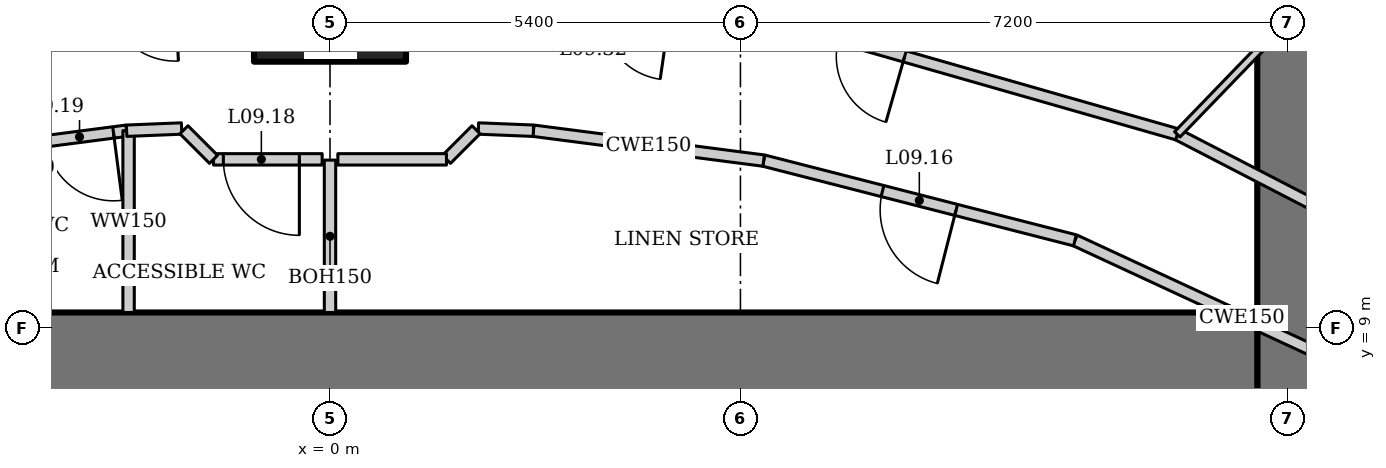
"""IFC4 building model, lengths in metres.
Left out: names, types, materials, properties, quantities, classifications, styles, units other than length and angle.
Written with IfcOpenShell. Run it as: python <this file> out.ifc"""

import sys

from ifc_helpers import new_model, si_unit, direction, frame, frame_2d, origin, origin_2d, place, context, subcontext, project, spatial, rectangle, hollow_rectangle, extrude, element, fill, save


model = new_model("IFC4")
c1 = context("Model", 3, precision=1e-05, world=origin(), true_north=direction((0.0, 1.0)))
c2 = subcontext(c1, "Body", "Model", "MODEL_VIEW")
j1 = project(units=[si_unit("LENGTHUNIT", "METRE"), si_unit("PLANEANGLEUNIT", "RADIAN")], contexts=[c1])
p1 = place(None, origin())
s1 = spatial("IfcSite", under=j1, at=p1, CompositionType="ELEMENT")
p2 = place(p1, origin())
s2 = spatial("IfcBuilding", under=s1, at=p2, CompositionType="ELEMENT")
p3 = place(p2, frame((0.0, 0.0, 47.8)))
s3 = spatial("IfcBuildingStorey", under=s2, at=p3, CompositionType="ELEMENT", Elevation=47.8)
p4 = place(p3, frame((0.0, 13.5, 0.0), z_axis=(0.0, 0.0, 1.0), x_axis=(1.0, 0.0, 0.0)))
e1 = element("IfcColumn", 1, at=p4, inside=s3, PredefinedType="COLUMN", context=c2, shape_type="SweptSolid", body=[
    extrude(hollow_rectangle(XDim=2.0, YDim=2.0, WallThickness=0.17, at=origin_2d()), origin(), (0.0, 0.0, 1.0), 3.6),
])
p5 = place(p3, frame((13.2, -13.0, 0.0), z_axis=(0.0, 0.0, 1.0), x_axis=(0.0, 1.0, 0.0)))
e2 = element("IfcWall", 2, at=p5, inside=s3, PredefinedType="SHEAR", context=c2, shape_type="SweptSolid", body=[
    extrude(rectangle(XDim=26.0, YDim=2.0, at=frame_2d((13.0, 0.0))), origin(), (0.0, 0.0, 1.0), 3.6),
])
p6 = place(p5, frame((12.1, 0.0, 0.0)))
e3 = element("IfcOpeningElement", 3, at=p6, cuts=e2, PredefinedType="OPENING", context=c2, shape_type="SweptSolid", body=[
    extrude(rectangle(XDim=1.8, YDim=2.1, at=frame_2d((0.9, 1.05))), frame((0.0, 1.01, 0.0), z_axis=(0.0, -1.0, 0.0), x_axis=(1.0, 0.0, 0.0)), (0.0, 0.0, 1.0), 2.02),
])
p7 = place(p3, frame((12.2, 8.0, 0.0), z_axis=(0.0, 0.0, 1.0), x_axis=(-1.0, 0.0, 0.0)))
e4 = element("IfcWall", 4, at=p7, inside=s3, PredefinedType="SHEAR", context=c2, shape_type="SweptSolid", body=[
    extrude(rectangle(XDim=24.4, YDim=2.4, at=frame_2d((12.2, 0.0))), origin(), (0.0, 0.0, 1.0), 3.6),
])
p8 = place(p3, frame((15.901, 9.086, 0.0), z_axis=(0.0, 0.0, 1.0), x_axis=(-0.888333171507, 0.459199495209, 0.0)))
e5 = element("IfcWall", 5, at=p8, inside=s3, PredefinedType="PARTITIONING", context=c2, shape_type="SweptSolid", body=[
    extrude(rectangle(XDim=5.351, YDim=0.15, at=frame_2d((2.676, 0.0))), origin(), (0.0, 0.0, 1.0), 3.45),
])
p9 = place(p3, frame((11.147, 11.544, 0.0), z_axis=(0.0, 0.0, 1.0), x_axis=(-0.961464178199, 0.27493023486, 0.0)))
e6 = element("IfcWall", 6, at=p9, inside=s3, PredefinedType="PARTITIONING", context=c2, shape_type="SweptSolid", body=[
    extrude(rectangle(XDim=4.78, YDim=0.15, at=frame_2d((2.39, 0.0))), origin(), (0.0, 0.0, 1.0), 3.45),
])
p10 = place(p9, frame((3.73, 0.0, 0.0)))
e7 = element("IfcOpeningElement", 7, at=p10, cuts=e6, PredefinedType="OPENING", context=c2, shape_type="SweptSolid", body=[
    extrude(rectangle(XDim=0.9, YDim=2.1, at=frame_2d((0.45, 1.05))), frame((0.0, 0.085, 0.0), z_axis=(0.0, -1.0, 0.0), x_axis=(1.0, 0.0, 0.0)), (0.0, 0.0, 1.0), 0.17),
])
p11 = place(p3, frame((14.196, 8.112, 0.0), z_axis=(0.0, 0.0, 1.0), x_axis=(-0.907279653965, 0.420527798727, 0.0)))
e8 = element("IfcWall", 8, at=p11, inside=s3, PredefinedType="PARTITIONING", context=c2, shape_type="SweptSolid", body=[
    extrude(rectangle(XDim=4.844, YDim=0.15, at=frame_2d((2.422, 0.0))), origin(), (0.0, 0.0, 1.0), 3.45),
])
p12 = place(p3, frame((9.801, 10.149, 0.0), z_axis=(0.0, 0.0, 1.0), x_axis=(-0.968705891355, 0.248211393886, 0.0)))
e9 = element("IfcWall", 9, at=p12, inside=s3, PredefinedType="PARTITIONING", context=c2, shape_type="SweptSolid", body=[
    extrude(rectangle(XDim=4.228, YDim=0.15, at=frame_2d((2.114, 0.0))), origin(), (0.0, 0.0, 1.0), 3.45),
])
p13 = place(p12, frame((1.614, 0.0, 0.0)))
e10 = element("IfcOpeningElement", 10, at=p13, cuts=e9, PredefinedType="OPENING", context=c2, shape_type="SweptSolid", body=[
    extrude(rectangle(XDim=1.0, YDim=2.1, at=frame_2d((0.5, 1.05))), frame((0.0, 0.085, 0.0), z_axis=(0.0, -1.0, 0.0), x_axis=(1.0, 0.0, 0.0)), (0.0, 0.0, 1.0), 0.17),
])
p14 = place(p3, frame((5.706, 11.198, 0.0), z_axis=(0.0, 0.0, 1.0), x_axis=(-0.99168929531, 0.128655903743, 0.0)))
e11 = element("IfcWall", 11, at=p14, inside=s3, PredefinedType="PARTITIONING", context=c2, shape_type="SweptSolid", body=[
    extrude(rectangle(XDim=3.055, YDim=0.15, at=frame_2d((1.528, 0.0))), origin(), (0.0, 0.0, 1.0), 3.45),
])
p15 = place(p3, frame((-2.676, 11.592, 0.0), z_axis=(0.0, 0.0, 1.0), x_axis=(-0.99168929531, -0.128655903743, 0.0)))
e12 = element("IfcWall", 12, at=p15, inside=s3, PredefinedType="PARTITIONING", context=c2, shape_type="SweptSolid", body=[
    extrude(rectangle(XDim=3.055, YDim=0.15, at=frame_2d((1.528, 0.0))), origin(), (0.0, 0.0, 1.0), 3.45),
])
p16 = place(p15, frame((0.175, 0.0, 0.0)))
e13 = element("IfcOpeningElement", 13, at=p16, cuts=e12, PredefinedType="OPENING", context=c2, shape_type="SweptSolid", body=[
    extrude(rectangle(XDim=0.9, YDim=2.1, at=frame_2d((0.45, 1.05))), frame((0.0, 0.085, 0.0), z_axis=(0.0, -1.0, 0.0), x_axis=(1.0, 0.0, 0.0)), (0.0, 0.0, 1.0), 0.17),
])
p17 = place(p3, frame((-2.65, 9.2, 0.0), z_axis=(0.0, 0.0, 1.0), x_axis=(0.0, 1.0, 0.0)))
e14 = element("IfcWall", 14, at=p17, inside=s3, PredefinedType="SOLIDWALL", context=c2, shape_type="SweptSolid", body=[
    extrude(rectangle(XDim=2.393, YDim=0.15, at=frame_2d((1.196, 0.0))), origin(), (0.0, 0.0, 1.0), 2.767),
])
p18 = place(p3, frame((16.944, 17.545, 0.0), z_axis=(0.0, 0.0, 1.0), x_axis=(-0.694680670522, -0.71931826475, 0.0)))
e15 = element("IfcWall", 15, at=p18, inside=s3, PredefinedType="PARTITIONING", context=c2, shape_type="SweptSolid", body=[
    extrude(rectangle(XDim=8.344, YDim=0.1, at=frame_2d((4.172, 0.0))), origin(), (0.0, 0.0, 1.0), 2.528),
])
p19 = place(p18, frame((3.722, 0.0, 0.0)))
e16 = element("IfcOpeningElement", 16, at=p19, cuts=e15, PredefinedType="OPENING", context=c2, shape_type="SweptSolid", body=[
    extrude(rectangle(XDim=0.9, YDim=2.1, at=frame_2d((0.45, 1.05))), frame((0.0, 0.06, 0.0), z_axis=(0.0, -1.0, 0.0), x_axis=(1.0, 0.0, 0.0)), (0.0, 0.0, 1.0), 0.12),
])
for number, where, z_axis, x_axis in (
    (17, (2.676, 11.592, 0.0), (0.0, 0.0, 1.0), (-0.999, 0.04, 0.0)),
    (18, (-1.952, 11.621, 0.0), (0.0, 0.0, 1.0), (-0.999, -0.04, 0.0)),
):
    element("IfcWall", number, at=place(p3, frame(where, z_axis=z_axis, x_axis=x_axis)), inside=s3, PredefinedType="PARTITIONING", context=c2, shape_type="SweptSolid", body=[
        extrude(rectangle(XDim=0.724, YDim=0.15, at=frame_2d((0.362, 0.0))), origin(), (0.0, 0.0, 1.0), 3.45),
    ])
p20 = place(p3, frame((0.0, 9.2, 0.0), z_axis=(0.0, 0.0, 1.0), x_axis=(0.0, 1.0, 0.0)))
e19 = element("IfcWall", 19, at=p20, inside=s3, PredefinedType="PARTITIONING", context=c2, shape_type="SweptSolid", body=[
    extrude(rectangle(XDim=2.005, YDim=0.15, at=frame_2d((1.002, 0.0))), origin(), (0.0, 0.0, 1.0), 3.043),
])
p21 = place(p3, frame((1.922, 11.604, 0.0), z_axis=(0.0, 0.0, 1.0), x_axis=(-0.707328479487, -0.706885013356, 0.0)))
e20 = element("IfcWall", 20, at=p21, inside=s3, PredefinedType="PARTITIONING", context=c2, shape_type="SweptSolid", body=[
    extrude(rectangle(XDim=0.551, YDim=0.15, at=frame_2d((0.275, 0.0))), origin(), (0.0, 0.0, 1.0), 3.45),
])
p22 = place(p3, frame((1.532, 11.215, 0.0), z_axis=(0.0, 0.0, 1.0), x_axis=(-1.0, 0.0, 0.0)))
e21 = element("IfcWall", 21, at=p22, inside=s3, PredefinedType="PARTITIONING", context=c2, shape_type="SweptSolid", body=[
    extrude(rectangle(XDim=1.429, YDim=0.15, at=frame_2d((0.714, 0.0))), origin(), (0.0, 0.0, 1.0), 3.45),
])
p23 = place(p3, frame((-0.103, 11.215, 0.0), z_axis=(0.0, 0.0, 1.0), x_axis=(-1.0, 0.0, 0.0)))
e22 = element("IfcWall", 22, at=p23, inside=s3, PredefinedType="PARTITIONING", context=c2, shape_type="SweptSolid", body=[
    extrude(rectangle(XDim=1.429, YDim=0.15, at=frame_2d((0.714, 0.0))), origin(), (0.0, 0.0, 1.0), 3.45),
])
p24 = place(p23, frame((0.3, 0.0, 0.0)))
e23 = element("IfcOpeningElement", 23, at=p24, cuts=e22, PredefinedType="OPENING", context=c2, shape_type="SweptSolid", body=[
    extrude(rectangle(XDim=1.0, YDim=2.1, at=frame_2d((0.5, 1.05))), frame((0.0, 0.085, 0.0), z_axis=(0.0, -1.0, 0.0), x_axis=(1.0, 0.0, 0.0)), (0.0, 0.0, 1.0), 0.17),
])
p25 = place(p3, frame((-1.532, 11.215, 0.0), z_axis=(0.0, 0.0, 1.0), x_axis=(-0.707328479487, 0.706885013356, 0.0)))
e24 = element("IfcWall", 24, at=p25, inside=s3, PredefinedType="PARTITIONING", context=c2, shape_type="SweptSolid", body=[
    extrude(rectangle(XDim=0.551, YDim=0.15, at=frame_2d((0.275, 0.0))), origin(), (0.0, 0.0, 1.0), 3.45),
])
p26 = place(p13, origin())
e25 = element("IfcDoor", 25, at=p26, inside=s3, OperationType="SINGLE_SWING_LEFT", PredefinedType="DOOR", context=c2, shape_type="SweptSolid", body=[
    extrude(rectangle(XDim=1.0, YDim=2.1, at=frame_2d((0.5, 1.05))), frame((0.0, 0.025, 0.0), z_axis=(0.0, -1.0, 0.0), x_axis=(1.0, 0.0, 0.0)), (0.0, 0.0, 1.0), 0.05),
])
fill(e10, e25)
p27 = place(p24, origin())
e26 = element("IfcDoor", 26, at=p27, inside=s3, OperationType="SINGLE_SWING_LEFT", PredefinedType="DOOR", context=c2, shape_type="SweptSolid", body=[
    extrude(rectangle(XDim=1.0, YDim=2.1, at=frame_2d((0.5, 1.05))), frame((0.0, 0.025, 0.0), z_axis=(0.0, -1.0, 0.0), x_axis=(1.0, 0.0, 0.0)), (0.0, 0.0, 1.0), 0.05),
])
fill(e23, e26)
p28 = place(p16, origin())
e27 = element("IfcDoor", 27, at=p28, inside=s3, OperationType="SINGLE_SWING_LEFT", PredefinedType="DOOR", context=c2, shape_type="SweptSolid", body=[
    extrude(rectangle(XDim=0.9, YDim=2.1, at=frame_2d((0.45, 1.05))), frame((0.0, 0.025, 0.0), z_axis=(0.0, -1.0, 0.0), x_axis=(1.0, 0.0, 0.0)), (0.0, 0.0, 1.0), 0.05),
])
fill(e13, e27)
p29 = place(p10, origin())
e28 = element("IfcDoor", 28, at=p29, inside=s3, OperationType="SINGLE_SWING_LEFT", PredefinedType="DOOR", context=c2, shape_type="SweptSolid", body=[
    extrude(rectangle(XDim=0.9, YDim=2.1, at=frame_2d((0.45, 1.05))), frame((0.0, 0.025, 0.0), z_axis=(0.0, -1.0, 0.0), x_axis=(1.0, 0.0, 0.0)), (0.0, 0.0, 1.0), 0.05),
])
fill(e7, e28)
save(model, sys.argv[1])
